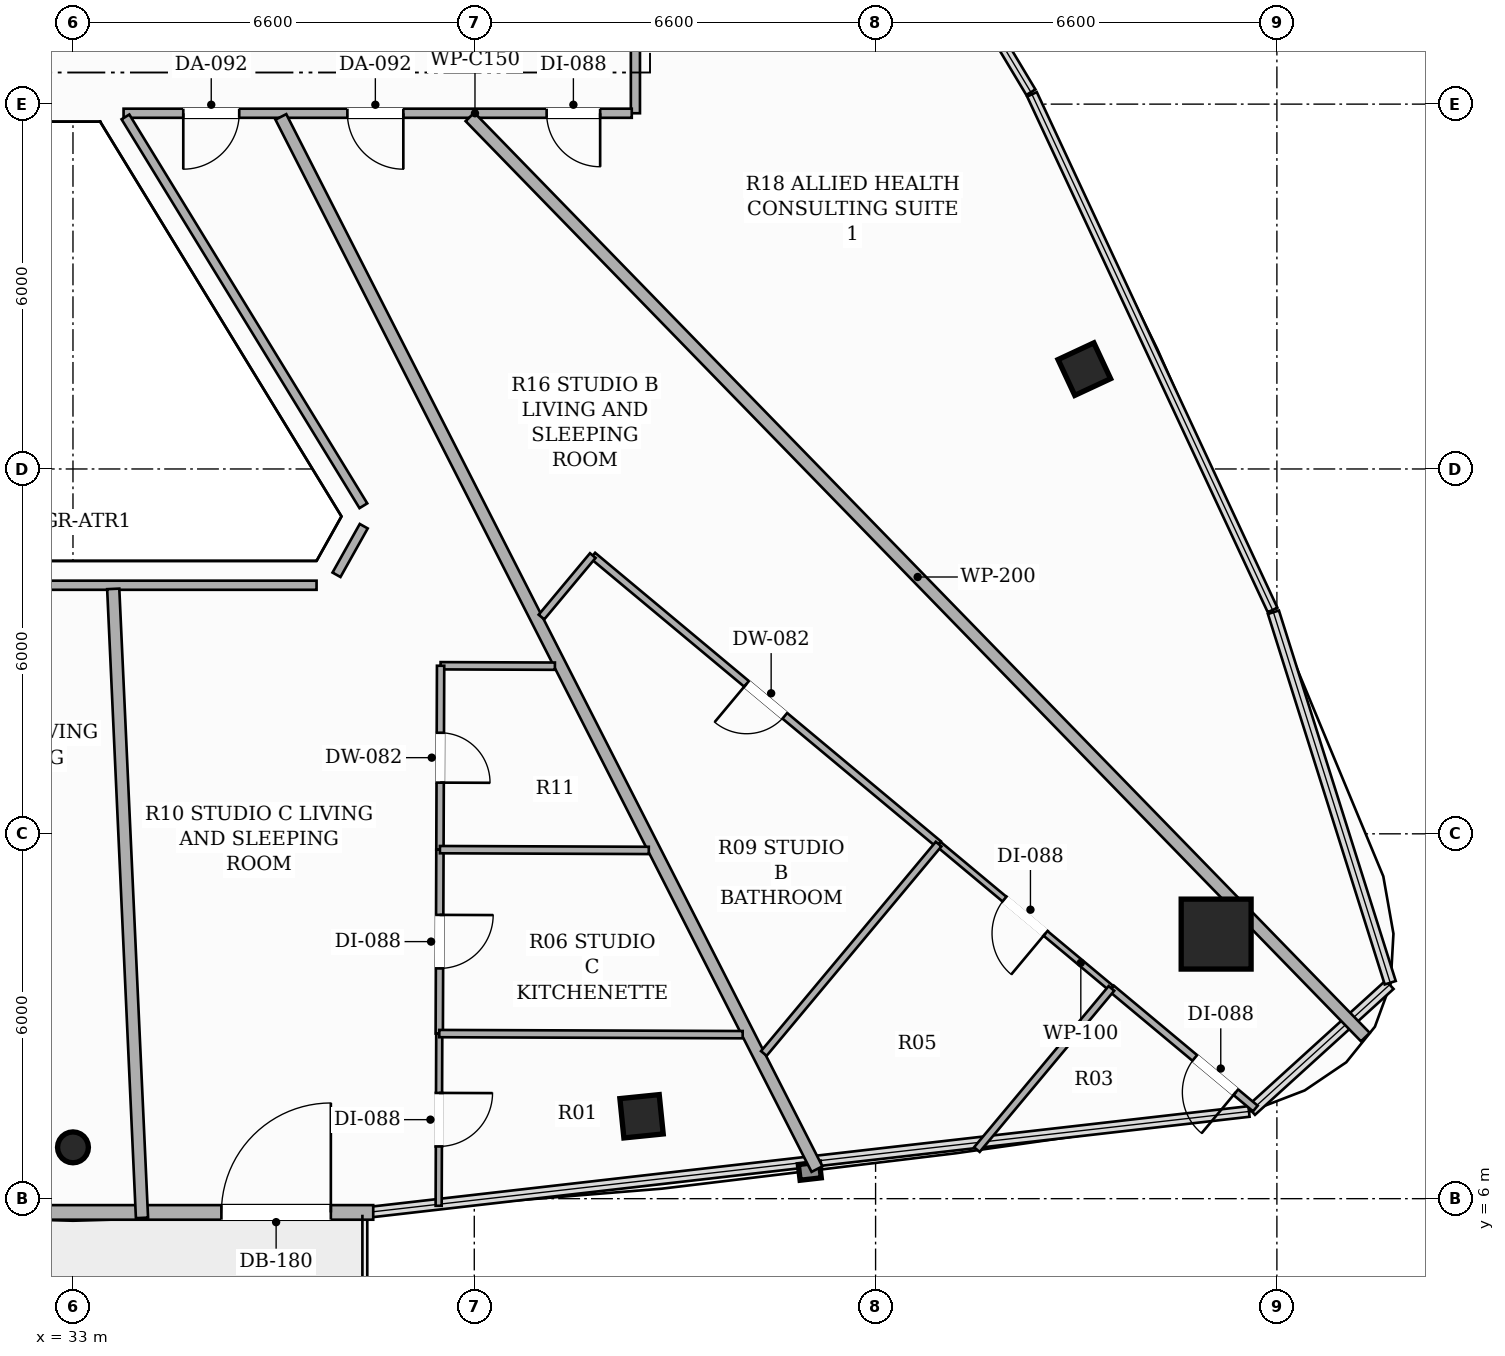
"""IFC4 building model, lengths in metres.
Left out: names, types, materials, properties, quantities, classifications, styles, units other than length and angle.
Written with IfcOpenShell. Run it as: python <this file> out.ifc"""

import sys

from ifc_helpers import new_model, si_unit, direction, frame, frame_2d, origin, origin_2d, place, context, subcontext, project, spatial, rectangle, hollow_rectangle, hollow_circle, extrude, element, fill, save


model = new_model("IFC4")
c1 = context("Model", 3, precision=1e-05, world=origin(), true_north=direction((0.0, 1.0)))
c2 = subcontext(c1, "Body", "Model", "MODEL_VIEW")
j1 = project(units=[si_unit("LENGTHUNIT", "METRE"), si_unit("PLANEANGLEUNIT", "RADIAN")], contexts=[c1])
p1 = place(None, origin())
s1 = spatial("IfcSite", under=j1, at=p1, CompositionType="ELEMENT")
p2 = place(p1, origin())
s2 = spatial("IfcBuilding", under=s1, at=p2, CompositionType="ELEMENT")
p3 = place(p2, frame((0.0, 0.0, 270.05)))
s3 = spatial("IfcBuildingStorey", under=s2, at=p3, CompositionType="ELEMENT", Elevation=270.05)
p4 = place(p3, frame((51.801, 10.351, 0.0), z_axis=(0.0, 0.0, 1.0), x_axis=(1.0, 0.0, 0.0)))
e1 = element("IfcColumn", 1, at=p4, inside=s3, PredefinedType="COLUMN", context=c2, shape_type="SweptSolid", body=[
    extrude(hollow_rectangle(XDim=1.15, YDim=1.15, WallThickness=0.036, at=origin_2d()), origin(), (0.0, 0.0, 1.0), 3.3),
])
p5 = place(p3, frame((33.0, 6.844, 0.0), z_axis=(0.0, 0.0, 1.0), x_axis=(1.0, 0.0, 0.0)))
e2 = element("IfcColumn", 2, at=p5, inside=s3, PredefinedType="COLUMN", context=c2, shape_type="SweptSolid", body=[
    extrude(hollow_circle(Radius=0.254, WallThickness=0.016, at=origin_2d()), origin(), (0.0, 0.0, 1.0), 3.3),
])
for number, where, z_axis, x_axis in (
    (3, (42.351, 7.355, 0.0), (0.0, 0.0, 1.0), (0.995, 0.101, 0.0)),
    (4, (49.633, 19.642, 0.0), (0.0, 0.0, 1.0), (-0.423, 0.906, 0.0)),
):
    element("IfcColumn", number, at=place(p3, frame(where, z_axis=z_axis, x_axis=x_axis)), inside=s3, PredefinedType="COLUMN", context=c2, shape_type="SweptSolid", body=[
        extrude(hollow_rectangle(XDim=0.65, YDim=0.65, WallThickness=0.022, at=origin_2d()), origin(), (0.0, 0.0, 1.0), 3.3),
    ])
p6 = place(p3, frame((28.062, 5.774, 0.0), z_axis=(0.0, 0.0, 1.0), x_axis=(1.0, 0.0, 0.0)))
e5 = element("IfcWall", 5, at=p6, inside=s3, PredefinedType="SOLIDWALL", context=c2, shape_type="SweptSolid", body=[
    extrude(rectangle(XDim=9.876, YDim=0.24, at=frame_2d((4.938, 0.0))), origin(), (0.0, 0.0, 1.0), 2.624),
])
p7 = place(p6, frame((7.379, 0.0, 0.0)))
e6 = element("IfcOpeningElement", 6, at=p7, cuts=e5, PredefinedType="OPENING", context=c2, shape_type="SweptSolid", body=[
    extrude(rectangle(XDim=1.8, YDim=2.2, at=frame_2d((0.9, 1.1))), frame((0.0, 0.13, 0.0), z_axis=(0.0, -1.0, 0.0), x_axis=(1.0, 0.0, 0.0)), (0.0, 0.0, 1.0), 0.26),
])
p8 = place(p3, frame((42.25, 26.59, 0.0), z_axis=(0.0, 0.0, 1.0), x_axis=(0.0, -1.0, 0.0)))
e7 = element("IfcWall", 7, at=p8, inside=s3, PredefinedType="PARTITIONING", context=c2, shape_type="SweptSolid", body=[
    extrude(rectangle(XDim=2.74, YDim=0.15, at=frame_2d((1.37, 0.0))), origin(), (0.0, 0.0, 1.0), 2.773),
])
p9 = place(p3, frame((42.19, 23.85, 0.0), z_axis=(0.0, 0.0, 1.0), x_axis=(-1.0, 0.0, 0.0)))
e8 = element("IfcWall", 8, at=p9, inside=s3, PredefinedType="PARTITIONING", context=c2, shape_type="SweptSolid", body=[
    extrude(rectangle(XDim=8.358, YDim=0.15, at=frame_2d((4.179, 0.0))), origin(), (0.0, 0.0, 1.0), 2.565),
])
p10 = place(p9, frame((0.52, 0.0, 0.0)))
e9 = element("IfcOpeningElement", 9, at=p10, cuts=e8, PredefinedType="OPENING", context=c2, shape_type="SweptSolid", body=[
    extrude(rectangle(XDim=0.88, YDim=2.1, at=frame_2d((0.44, 1.05))), frame((0.0, 0.085, 0.0), z_axis=(0.0, -1.0, 0.0), x_axis=(1.0, 0.0, 0.0)), (0.0, 0.0, 1.0), 0.17),
])
p11 = place(p9, frame((3.757, 0.0, 0.0)))
e10 = element("IfcOpeningElement", 10, at=p11, cuts=e8, PredefinedType="OPENING", context=c2, shape_type="SweptSolid", body=[
    extrude(rectangle(XDim=0.92, YDim=2.15, at=frame_2d((0.46, 1.075))), frame((0.0, 0.085, 0.0), z_axis=(0.0, -1.0, 0.0), x_axis=(1.0, 0.0, 0.0)), (0.0, 0.0, 1.0), 0.17),
])
p12 = place(p9, frame((6.456, 0.0, 0.0)))
e11 = element("IfcOpeningElement", 11, at=p12, cuts=e8, PredefinedType="OPENING", context=c2, shape_type="SweptSolid", body=[
    extrude(rectangle(XDim=0.92, YDim=2.15, at=frame_2d((0.46, 1.075))), frame((0.0, 0.085, 0.0), z_axis=(0.0, -1.0, 0.0), x_axis=(1.0, 0.0, 0.0)), (0.0, 0.0, 1.0), 0.17),
])
p13 = place(p3, frame((33.863, 23.79, 0.0), z_axis=(0.0, 0.0, 1.0), x_axis=(0.521913594497, -0.852998358661, 0.0)))
e12 = element("IfcWall", 12, at=p13, inside=s3, PredefinedType="PARTITIONING", context=c2, shape_type="SweptSolid", body=[
    extrude(rectangle(XDim=7.497, YDim=0.15, at=frame_2d((3.749, 0.0))), origin(), (0.0, 0.0, 1.0), 2.773),
])
p14 = place(p3, frame((37.782, 17.059, 0.0), z_axis=(0.0, 0.0, 1.0), x_axis=(-0.489033415255, -0.872265050752, 0.0)))
e13 = element("IfcWall", 13, at=p14, inside=s3, PredefinedType="PARTITIONING", context=c2, shape_type="SweptSolid", body=[
    extrude(rectangle(XDim=0.916, YDim=0.15, at=frame_2d((0.458, 0.0))), origin(), (0.0, 0.0, 1.0), 3.06),
])
p15 = place(p3, frame((37.006, 16.088, 0.0), z_axis=(0.0, 0.0, 1.0), x_axis=(-1.0, 0.0, 0.0)))
e14 = element("IfcWall", 14, at=p15, inside=s3, PredefinedType="PARTITIONING", context=c2, shape_type="SweptSolid", body=[
    extrude(rectangle(XDim=8.012, YDim=0.15, at=frame_2d((4.006, 0.0))), origin(), (0.0, 0.0, 1.0), 2.773),
])
p16 = place(p3, frame((54.255, 8.657, 0.0), z_axis=(0.0, 0.0, 1.0), x_axis=(-0.69739814005, 0.716683915164, 0.0)))
e15 = element("IfcWall", 15, at=p16, inside=s3, PredefinedType="PARTITIONING", context=c2, shape_type="SweptSolid", body=[
    extrude(rectangle(XDim=21.115, YDim=0.2, at=frame_2d((10.558, 0.0))), origin(), (0.0, 0.0, 1.0), 2.492),
])
p17 = place(p3, frame((45.236, 6.486, 0.0), z_axis=(0.0, 0.0, 1.0), x_axis=(-0.454004119661, 0.890999584361, 0.0)))
e16 = element("IfcWall", 16, at=p17, inside=s3, PredefinedType="PARTITIONING", context=c2, shape_type="SweptSolid", body=[
    extrude(rectangle(XDim=19.421, YDim=0.2, at=frame_2d((9.71, 0.0))), origin(), (0.0, 0.0, 1.0), 2.492),
])
p18 = place(p3, frame((34.135, 5.684, 0.0), z_axis=(0.0, 0.0, 1.0), x_axis=(-0.045669685987, 0.998956595545, 0.0)))
e17 = element("IfcWall", 17, at=p18, inside=s3, PredefinedType="PARTITIONING", context=c2, shape_type="SweptSolid", body=[
    extrude(rectangle(XDim=10.355, YDim=0.2, at=frame_2d((5.177, 0.0))), origin(), (0.0, 0.0, 1.0), 2.492),
])
p19 = place(p3, frame((47.236, 11.831, 0.0), z_axis=(0.0, 0.0, 1.0), x_axis=(-0.767842880201, 0.640638206264, 0.0)))
e18 = element("IfcWall", 18, at=p19, inside=s3, PredefinedType="PARTITIONING", context=c2, shape_type="SweptSolid", body=[
    extrude(rectangle(XDim=7.406, YDim=0.12, at=frame_2d((3.703, 0.0))), origin(), (0.0, 0.0, 1.0), 2.773),
])
p20 = place(p19, frame((3.293, 0.0, 0.0)))
e19 = element("IfcOpeningElement", 19, at=p20, cuts=e18, PredefinedType="OPENING", context=c2, shape_type="SweptSolid", body=[
    extrude(rectangle(XDim=0.82, YDim=2.1, at=frame_2d((0.41, 1.05))), frame((0.0, 0.07, 0.0), z_axis=(0.0, -1.0, 0.0), x_axis=(1.0, 0.0, 0.0)), (0.0, 0.0, 1.0), 0.14),
])
p21 = place(p3, frame((41.549, 16.576, 0.0), z_axis=(0.0, 0.0, 1.0), x_axis=(-0.640858814593, -0.767658765181, 0.0)))
e20 = element("IfcWall", 20, at=p21, inside=s3, PredefinedType="PARTITIONING", context=c2, shape_type="SweptSolid", body=[
    extrude(rectangle(XDim=1.317, YDim=0.12, at=frame_2d((0.658, 0.0))), origin(), (0.0, 0.0, 1.0), 2.773),
])
p22 = place(p3, frame((52.446, 7.483, 0.0), z_axis=(0.0, 0.0, 1.0), x_axis=(-0.76779917016, 0.640690591707, 0.0)))
e21 = element("IfcWall", 21, at=p22, inside=s3, PredefinedType="PARTITIONING", context=c2, shape_type="SweptSolid", body=[
    extrude(rectangle(XDim=3.083, YDim=0.12, at=frame_2d((1.542, 0.0))), origin(), (0.0, 0.0, 1.0), 2.492),
])
p23 = place(p22, frame((0.418, 0.0, 0.0)))
e22 = element("IfcOpeningElement", 22, at=p23, cuts=e21, PredefinedType="OPENING", context=c2, shape_type="SweptSolid", body=[
    extrude(rectangle(XDim=0.88, YDim=2.1, at=frame_2d((0.44, 1.05))), frame((0.0, 0.07, 0.0), z_axis=(0.0, -1.0, 0.0), x_axis=(1.0, 0.0, 0.0)), (0.0, 0.0, 1.0), 0.14),
])
p24 = place(p3, frame((50.079, 9.458, 0.0), z_axis=(0.0, 0.0, 1.0), x_axis=(-0.767707674805, 0.640800223195, 0.0)))
e23 = element("IfcWall", 23, at=p24, inside=s3, PredefinedType="PARTITIONING", context=c2, shape_type="SweptSolid", body=[
    extrude(rectangle(XDim=3.703, YDim=0.1, at=frame_2d((1.852, 0.0))), origin(), (0.0, 0.0, 1.0), 2.492),
])
p25 = place(p24, frame((1.412, 0.0, 0.0)))
e24 = element("IfcOpeningElement", 24, at=p25, cuts=e23, PredefinedType="OPENING", context=c2, shape_type="SweptSolid", body=[
    extrude(rectangle(XDim=0.88, YDim=2.1, at=frame_2d((0.44, 1.05))), frame((0.0, 0.06, 0.0), z_axis=(0.0, -1.0, 0.0), x_axis=(1.0, 0.0, 0.0)), (0.0, 0.0, 1.0), 0.12),
])
p26 = place(p3, frame((47.236, 11.831, 0.0), z_axis=(0.0, 0.0, 1.0), x_axis=(-0.640810637278, -0.767698982122, 0.0)))
e25 = element("IfcWall", 25, at=p26, inside=s3, PredefinedType="PARTITIONING", context=c2, shape_type="SweptSolid", body=[
    extrude(rectangle(XDim=4.485, YDim=0.12, at=frame_2d((2.242, 0.0))), origin(), (0.0, 0.0, 1.0), 2.492),
])
p27 = place(p3, frame((47.866, 6.807, 0.0), z_axis=(0.0, 0.0, 1.0), x_axis=(0.640844750015, 0.767670506388, 0.0)))
e26 = element("IfcWall", 26, at=p27, inside=s3, PredefinedType="PARTITIONING", context=c2, shape_type="SweptSolid", body=[
    extrude(rectangle(XDim=3.453, YDim=0.12, at=frame_2d((1.727, 0.0))), origin(), (0.0, 0.0, 1.0), 2.492),
])
p28 = place(p3, frame((40.926, 14.757, 0.0), z_axis=(0.0, 0.0, 1.0), x_axis=(-0.999993390212, 0.00363586741, 0.0)))
e27 = element("IfcWall", 27, at=p28, inside=s3, PredefinedType="PARTITIONING", context=c2, shape_type="SweptSolid", body=[
    extrude(rectangle(XDim=1.88, YDim=0.12, at=frame_2d((0.94, 0.0))), origin(), (0.0, 0.0, 1.0), 2.773),
])
p29 = place(p3, frame((39.046, 14.764, 0.0), z_axis=(0.0, 0.0, 1.0), x_axis=(-0.003633110206, -0.999993400233, 0.0)))
e28 = element("IfcWall", 28, at=p29, inside=s3, PredefinedType="PARTITIONING", context=c2, shape_type="SweptSolid", body=[
    extrude(rectangle(XDim=3.024, YDim=0.12, at=frame_2d((1.512, 0.0))), origin(), (0.0, 0.0, 1.0), 3.06),
])
p30 = place(p29, frame((1.102, 0.0, 0.0)))
e29 = element("IfcOpeningElement", 29, at=p30, cuts=e28, PredefinedType="OPENING", context=c2, shape_type="SweptSolid", body=[
    extrude(rectangle(XDim=0.82, YDim=2.1, at=frame_2d((0.41, 1.05))), frame((0.0, 0.07, 0.0), z_axis=(0.0, -1.0, 0.0), x_axis=(1.0, 0.0, 0.0)), (0.0, 0.0, 1.0), 0.14),
])
p31 = place(p3, frame((39.035, 11.74, 0.0), z_axis=(0.0, 0.0, 1.0), x_axis=(-0.003631937304, -0.999993404494, 0.0)))
e30 = element("IfcWall", 30, at=p31, inside=s3, PredefinedType="PARTITIONING", context=c2, shape_type="SweptSolid", body=[
    extrude(rectangle(XDim=3.025, YDim=0.12, at=frame_2d((1.512, 0.0))), origin(), (0.0, 0.0, 1.0), 3.06),
])
p32 = place(p31, frame((1.073, 0.0, 0.0)))
e31 = element("IfcOpeningElement", 31, at=p32, cuts=e30, PredefinedType="OPENING", context=c2, shape_type="SweptSolid", body=[
    extrude(rectangle(XDim=0.88, YDim=2.1, at=frame_2d((0.44, 1.05))), frame((0.0, 0.07, 0.0), z_axis=(0.0, -1.0, 0.0), x_axis=(1.0, 0.0, 0.0)), (0.0, 0.0, 1.0), 0.14),
])
p33 = place(p3, frame((39.024, 8.715, 0.0), z_axis=(0.0, 0.0, 1.0), x_axis=(-0.003534460681, -0.999993753774, 0.0)))
e32 = element("IfcWall", 32, at=p33, inside=s3, PredefinedType="PARTITIONING", context=c2, shape_type="SweptSolid", body=[
    extrude(rectangle(XDim=2.832, YDim=0.1, at=frame_2d((1.416, 0.0))), origin(), (0.0, 0.0, 1.0), 2.492),
])
p34 = place(p33, frame((0.976, 0.0, 0.0)))
e33 = element("IfcOpeningElement", 33, at=p34, cuts=e32, PredefinedType="OPENING", context=c2, shape_type="SweptSolid", body=[
    extrude(rectangle(XDim=0.88, YDim=2.1, at=frame_2d((0.44, 1.05))), frame((0.0, 0.06, 0.0), z_axis=(0.0, -1.0, 0.0), x_axis=(1.0, 0.0, 0.0)), (0.0, 0.0, 1.0), 0.12),
])
p35 = place(p3, frame((42.47, 11.727, 0.0), z_axis=(0.0, 0.0, 1.0), x_axis=(-0.999992905383, 0.003766853162, 0.0)))
e34 = element("IfcWall", 34, at=p35, inside=s3, PredefinedType="PARTITIONING", context=c2, shape_type="SweptSolid", body=[
    extrude(rectangle(XDim=3.435, YDim=0.12, at=frame_2d((1.718, 0.0))), origin(), (0.0, 0.0, 1.0), 2.773),
])
p36 = place(p3, frame((44.014, 8.697, 0.0), z_axis=(0.0, 0.0, 1.0), x_axis=(-0.999993445948, 0.003620505651, 0.0)))
e35 = element("IfcWall", 35, at=p36, inside=s3, PredefinedType="PARTITIONING", context=c2, shape_type="SweptSolid", body=[
    extrude(rectangle(XDim=4.99, YDim=0.12, at=frame_2d((2.495, 0.0))), origin(), (0.0, 0.0, 1.0), 2.773),
])
p37 = place(p7, origin())
e36 = element("IfcDoor", 36, at=p37, inside=s3, OperationType="SINGLE_SWING_RIGHT", PredefinedType="DOOR", context=c2, shape_type="SweptSolid", body=[
    extrude(rectangle(XDim=1.8, YDim=2.2, at=frame_2d((0.9, 1.1))), frame((0.0, 0.025, 0.0), z_axis=(0.0, -1.0, 0.0), x_axis=(1.0, 0.0, 0.0)), (0.0, 0.0, 1.0), 0.05),
])
fill(e6, e36)
p38 = place(p10, origin())
e37 = element("IfcDoor", 37, at=p38, inside=s3, OperationType="SINGLE_SWING_LEFT", PredefinedType="DOOR", context=c2, shape_type="SweptSolid", body=[
    extrude(rectangle(XDim=0.88, YDim=2.1, at=frame_2d((0.44, 1.05))), frame((0.0, 0.025, 0.0), z_axis=(0.0, -1.0, 0.0), x_axis=(1.0, 0.0, 0.0)), (0.0, 0.0, 1.0), 0.05),
])
fill(e9, e37)
p39 = place(p11, origin())
e38 = element("IfcDoor", 38, at=p39, inside=s3, OperationType="SINGLE_SWING_LEFT", PredefinedType="DOOR", context=c2, shape_type="SweptSolid", body=[
    extrude(rectangle(XDim=0.92, YDim=2.15, at=frame_2d((0.46, 1.075))), frame((0.0, 0.025, 0.0), z_axis=(0.0, -1.0, 0.0), x_axis=(1.0, 0.0, 0.0)), (0.0, 0.0, 1.0), 0.05),
])
fill(e10, e38)
p40 = place(p20, origin())
e39 = element("IfcDoor", 39, at=p40, inside=s3, OperationType="SINGLE_SWING_RIGHT", PredefinedType="DOOR", context=c2, shape_type="SweptSolid", body=[
    extrude(rectangle(XDim=0.82, YDim=2.1, at=frame_2d((0.41, 1.05))), frame((0.0, 0.025, 0.0), z_axis=(0.0, -1.0, 0.0), x_axis=(1.0, 0.0, 0.0)), (0.0, 0.0, 1.0), 0.05),
])
fill(e19, e39)
p41 = place(p23, origin())
e40 = element("IfcDoor", 40, at=p41, inside=s3, OperationType="SINGLE_SWING_LEFT", PredefinedType="DOOR", context=c2, shape_type="SweptSolid", body=[
    extrude(rectangle(XDim=0.88, YDim=2.1, at=frame_2d((0.44, 1.05))), frame((0.0, 0.025, 0.0), z_axis=(0.0, -1.0, 0.0), x_axis=(1.0, 0.0, 0.0)), (0.0, 0.0, 1.0), 0.05),
])
fill(e22, e40)
p42 = place(p25, origin())
e41 = element("IfcDoor", 41, at=p42, inside=s3, OperationType="SINGLE_SWING_LEFT", PredefinedType="DOOR", context=c2, shape_type="SweptSolid", body=[
    extrude(rectangle(XDim=0.88, YDim=2.1, at=frame_2d((0.44, 1.05))), frame((0.0, 0.025, 0.0), z_axis=(0.0, -1.0, 0.0), x_axis=(1.0, 0.0, 0.0)), (0.0, 0.0, 1.0), 0.05),
])
fill(e24, e41)
p43 = place(p12, origin())
e42 = element("IfcDoor", 42, at=p43, inside=s3, OperationType="SINGLE_SWING_RIGHT", PredefinedType="DOOR", context=c2, shape_type="SweptSolid", body=[
    extrude(rectangle(XDim=0.92, YDim=2.15, at=frame_2d((0.46, 1.075))), frame((0.0, 0.025, 0.0), z_axis=(0.0, -1.0, 0.0), x_axis=(1.0, 0.0, 0.0)), (0.0, 0.0, 1.0), 0.05),
])
fill(e11, e42)
p44 = place(p30, origin())
e43 = element("IfcDoor", 43, at=p44, inside=s3, OperationType="SINGLE_SWING_RIGHT", PredefinedType="DOOR", context=c2, shape_type="SweptSolid", body=[
    extrude(rectangle(XDim=0.82, YDim=2.1, at=frame_2d((0.41, 1.05))), frame((0.0, 0.025, 0.0), z_axis=(0.0, -1.0, 0.0), x_axis=(1.0, 0.0, 0.0)), (0.0, 0.0, 1.0), 0.05),
])
fill(e29, e43)
p45 = place(p32, origin())
e44 = element("IfcDoor", 44, at=p45, inside=s3, OperationType="SINGLE_SWING_LEFT", PredefinedType="DOOR", context=c2, shape_type="SweptSolid", body=[
    extrude(rectangle(XDim=0.88, YDim=2.1, at=frame_2d((0.44, 1.05))), frame((0.0, 0.025, 0.0), z_axis=(0.0, -1.0, 0.0), x_axis=(1.0, 0.0, 0.0)), (0.0, 0.0, 1.0), 0.05),
])
fill(e31, e44)
p46 = place(p34, origin())
e45 = element("IfcDoor", 45, at=p46, inside=s3, OperationType="SINGLE_SWING_LEFT", PredefinedType="DOOR", context=c2, shape_type="SweptSolid", body=[
    extrude(rectangle(XDim=0.88, YDim=2.1, at=frame_2d((0.44, 1.05))), frame((0.0, 0.025, 0.0), z_axis=(0.0, -1.0, 0.0), x_axis=(1.0, 0.0, 0.0)), (0.0, 0.0, 1.0), 0.05),
])
fill(e33, e45)
save(model, sys.argv[1])
